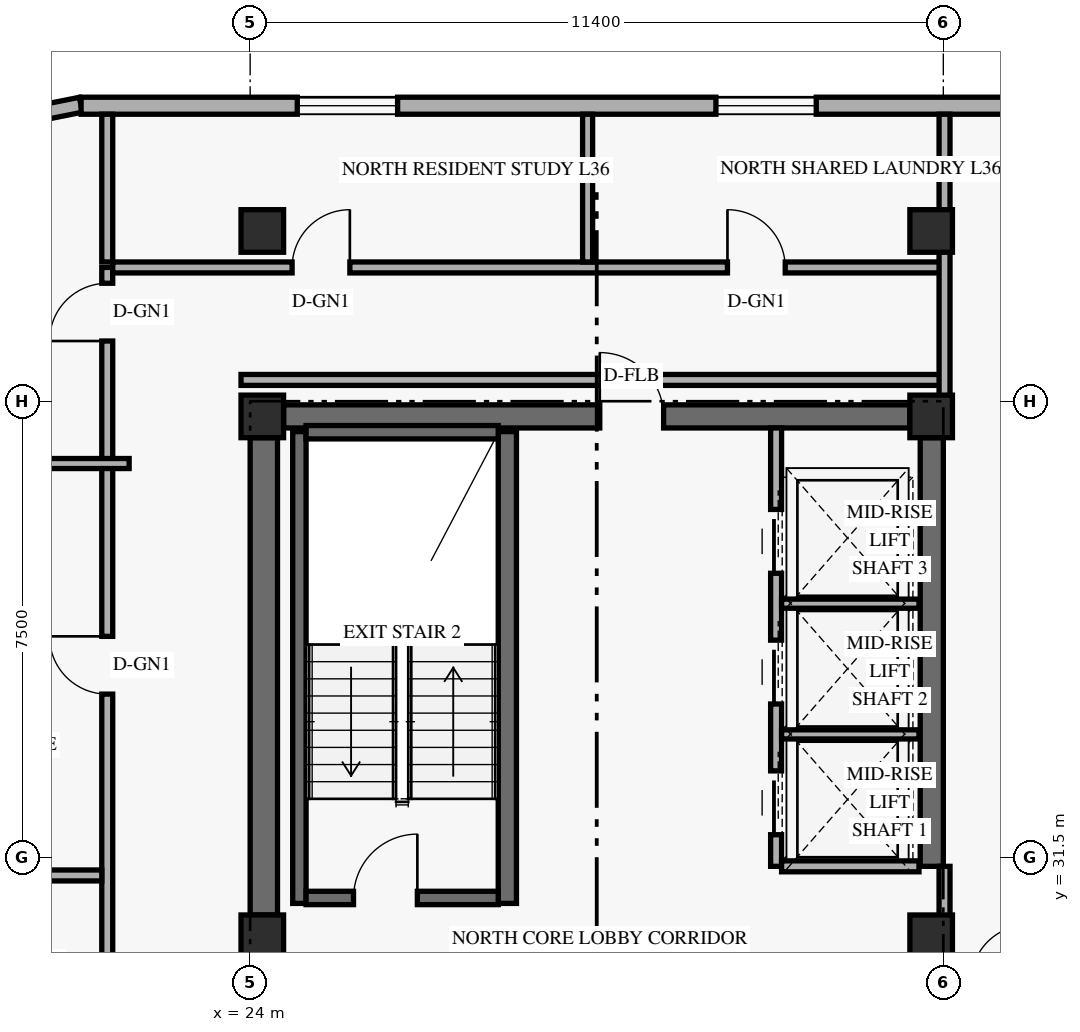
"""IFC4 building model, lengths in metres.
Left out: names, types, materials, properties, quantities, classifications, styles, units other than length and angle.
Written with IfcOpenShell. Run it as: python <this file> out.ifc"""

import sys

from ifc_helpers import new_model, si_unit, direction, frame, frame_2d, origin, origin_2d, place, context, subcontext, project, spatial, rectangle, extrude, element, fill, save


model = new_model("IFC4")
c1 = context("Model", 3, precision=1e-05, world=origin(), true_north=direction((0.0, 1.0)))
c2 = subcontext(c1, "Body", "Model", "MODEL_VIEW")
j1 = project(units=[si_unit("LENGTHUNIT", "METRE"), si_unit("PLANEANGLEUNIT", "RADIAN")], contexts=[c1])
p1 = place(None, origin())
s1 = spatial("IfcSite", under=j1, at=p1, CompositionType="ELEMENT")
p2 = place(p1, origin())
s2 = spatial("IfcBuilding", under=s1, at=p2, CompositionType="ELEMENT")
p3 = place(p2, frame((0.0, 0.0, 141.0)))
s3 = spatial("IfcBuildingStorey", under=s2, at=p3, CompositionType="ELEMENT", Elevation=141.0)
p4 = place(p3, frame((24.225, 30.55, 0.0), z_axis=(0.0, 0.0, 1.0), x_axis=(0.0, 1.0, 0.0)))
e1 = element("IfcWall", 1, at=p4, inside=s3, PredefinedType="SHEAR", context=c2, shape_type="SweptSolid", body=[
    extrude(rectangle(XDim=7.85, YDim=0.45, at=frame_2d((3.925, 0.0))), origin(), (0.0, 0.0, 1.0), 2.748),
])
p5 = place(p3, frame((35.21, 31.35, 0.0), z_axis=(0.0, 0.0, 1.0), x_axis=(0.0, 1.0, 0.0)))
e2 = element("IfcWall", 2, at=p5, inside=s3, PredefinedType="SHEAR", context=c2, shape_type="SweptSolid", body=[
    extrude(rectangle(XDim=7.05, YDim=0.38, at=frame_2d((3.525, 0.0))), origin(), (0.0, 0.0, 1.0), 2.748),
])
p6 = place(p3, frame((24.55, 38.75, 0.0), z_axis=(0.0, 0.0, 1.0), x_axis=(1.0, 0.0, 0.0)))
e3 = element("IfcWall", 3, at=p6, inside=s3, PredefinedType="SHEAR", context=c2, shape_type="SweptSolid", body=[
    extrude(rectangle(XDim=10.3, YDim=0.38, at=frame_2d((5.15, 0.0))), origin(), (0.0, 0.0, 1.0), 3.36),
])
p7 = place(p6, frame((5.2, 0.0, 0.0)))
e4 = element("IfcOpeningElement", 4, at=p7, cuts=e3, PredefinedType="OPENING", context=c2, shape_type="SweptSolid", body=[
    extrude(rectangle(XDim=1.05, YDim=2.15, at=frame_2d((0.525, 1.075))), frame((0.0, 0.2, 0.0), z_axis=(0.0, -1.0, 0.0), x_axis=(1.0, 0.0, 0.0)), (0.0, 0.0, 1.0), 0.4),
])
p8 = place(p3, frame((24.81, 30.74, 0.0), z_axis=(0.0, 0.0, 1.0), x_axis=(0.0, 1.0, 0.0)))
e5 = element("IfcWall", 5, at=p8, inside=s3, PredefinedType="SHEAR", context=c2, shape_type="SweptSolid", body=[
    extrude(rectangle(XDim=7.76, YDim=0.22, at=frame_2d((3.88, 0.0))), origin(), (0.0, 0.0, 1.0), 3.36),
])
p9 = place(p3, frame((28.23, 30.74, 0.0), z_axis=(0.0, 0.0, 1.0), x_axis=(0.0, 1.0, 0.0)))
e6 = element("IfcWall", 6, at=p9, inside=s3, PredefinedType="SHEAR", context=c2, shape_type="SweptSolid", body=[
    extrude(rectangle(XDim=7.76, YDim=0.3, at=frame_2d((3.88, 0.0))), origin(), (0.0, 0.0, 1.0), 3.36),
])
p10 = place(p3, frame((24.92, 30.83, 0.0), z_axis=(0.0, 0.0, 1.0), x_axis=(1.0, 0.0, 0.0)))
e7 = element("IfcWall", 7, at=p10, inside=s3, PredefinedType="SHEAR", context=c2, shape_type="SweptSolid", body=[
    extrude(rectangle(XDim=3.16, YDim=0.22, at=frame_2d((1.58, 0.0))), origin(), (0.0, 0.0, 1.0), 3.36),
])
p11 = place(p10, frame((0.78, 0.0, 0.0)))
e8 = element("IfcOpeningElement", 8, at=p11, cuts=e7, PredefinedType="OPENING", context=c2, shape_type="SweptSolid", body=[
    extrude(rectangle(XDim=1.05, YDim=2.15, at=frame_2d((0.525, 1.075))), frame((0.0, 0.12, 0.0), z_axis=(0.0, -1.0, 0.0), x_axis=(1.0, 0.0, 0.0)), (0.0, 0.0, 1.0), 0.24),
])
p12 = place(p3, frame((24.92, 38.49, 0.0), z_axis=(0.0, 0.0, 1.0), x_axis=(1.0, 0.0, 0.0)))
e9 = element("IfcWall", 9, at=p12, inside=s3, PredefinedType="SHEAR", context=c2, shape_type="SweptSolid", body=[
    extrude(rectangle(XDim=3.16, YDim=0.22, at=frame_2d((1.58, 0.0))), origin(), (0.0, 0.0, 1.0), 3.36),
])
for number, where, z_axis, x_axis in (
    (10, (24.2, 30.2, 0.0), (0.0, 0.0, 1.0), (1.0, 0.0, 0.0)),
    (11, (24.2, 38.75, 0.0), (0.0, 0.0, 1.0), (1.0, 0.0, 0.0)),
    (12, (24.2, 41.8, 0.0), (0.0, 0.0, 1.0), (1.0, 0.0, 0.0)),
    (13, (35.2, 30.2, 0.0), (0.0, 0.0, 1.0), (1.0, 0.0, 0.0)),
    (14, (35.2, 38.75, 0.0), (0.0, 0.0, 1.0), (1.0, 0.0, 0.0)),
    (15, (35.2, 41.8, 0.0), (0.0, 0.0, 1.0), (1.0, 0.0, 0.0)),
):
    element("IfcColumn", number, at=place(p3, frame(where, z_axis=z_axis, x_axis=x_axis)), inside=s3, PredefinedType="COLUMN", context=c2, shape_type="SweptSolid", body=[
        extrude(rectangle(XDim=0.7, YDim=0.7, at=origin_2d()), origin(), (0.0, 0.0, 1.0), 3.6),
    ])
p13 = place(p3, frame((21.217, 43.876, 0.0), z_axis=(0.0, 0.0, 1.0), x_axis=(-0.980809899341, -0.19496651342, 0.0)))
e16 = element("IfcWall", 16, at=p13, inside=s3, PredefinedType="SOLIDWALL", context=c2, shape_type="SweptSolid", body=[
    extrude(rectangle(XDim=1.389, YDim=0.25, at=frame_2d((0.694, 0.0))), origin(), (0.0, 0.0, 1.0), 3.36),
])
p14 = place(p3, frame((54.98, 43.86, 0.0), z_axis=(0.0, 0.0, 1.0), x_axis=(-1.0, 0.0, 0.0)))
e17 = element("IfcWall", 17, at=p14, inside=s3, PredefinedType="SOLIDWALL", context=c2, shape_type="SweptSolid", body=[
    extrude(rectangle(XDim=33.76, YDim=0.28, at=frame_2d((16.88, 0.0))), origin(), (0.0, 0.0, 1.0), 3.36),
])
p15 = place(p14, frame((28.555, 0.0, 0.85)))
e18 = element("IfcOpeningElement", 18, at=p15, cuts=e17, PredefinedType="OPENING", context=c2, shape_type="SweptSolid", body=[
    extrude(rectangle(XDim=1.65, YDim=1.6, at=frame_2d((0.825, 0.8))), frame((0.0, 0.15, 0.0), z_axis=(0.0, -1.0, 0.0), x_axis=(1.0, 0.0, 0.0)), (0.0, 0.0, 1.0), 0.3),
])
p16 = place(p14, frame((21.67, 0.0, 0.85)))
e19 = element("IfcOpeningElement", 19, at=p16, cuts=e17, PredefinedType="OPENING", context=c2, shape_type="SweptSolid", body=[
    extrude(rectangle(XDim=1.65, YDim=1.6, at=frame_2d((0.825, 0.8))), frame((0.0, 0.15, 0.0), z_axis=(0.0, -1.0, 0.0), x_axis=(1.0, 0.0, 0.0)), (0.0, 0.0, 1.0), 0.3),
])
p17 = place(p14, frame((14.476, 0.0, 0.85)))
e20 = element("IfcOpeningElement", 20, at=p17, cuts=e17, PredefinedType="OPENING", context=c2, shape_type="SweptSolid", body=[
    extrude(rectangle(XDim=1.65, YDim=1.6, at=frame_2d((0.825, 0.8))), frame((0.0, 0.15, 0.0), z_axis=(0.0, -1.0, 0.0), x_axis=(1.0, 0.0, 0.0)), (0.0, 0.0, 1.0), 0.3),
])
p18 = place(p14, frame((6.286, 0.0, 0.85)))
e21 = element("IfcOpeningElement", 21, at=p18, cuts=e17, PredefinedType="OPENING", context=c2, shape_type="SweptSolid", body=[
    extrude(rectangle(XDim=1.65, YDim=1.6, at=frame_2d((0.825, 0.8))), frame((0.0, 0.15, 0.0), z_axis=(0.0, -1.0, 0.0), x_axis=(1.0, 0.0, 0.0)), (0.0, 0.0, 1.0), 0.3),
])
p19 = place(p14, frame((0.971, 0.0, 0.85)))
e22 = element("IfcOpeningElement", 22, at=p19, cuts=e17, PredefinedType="OPENING", context=c2, shape_type="SweptSolid", body=[
    extrude(rectangle(XDim=1.65, YDim=1.6, at=frame_2d((0.825, 0.8))), frame((0.0, 0.15, 0.0), z_axis=(0.0, -1.0, 0.0), x_axis=(1.0, 0.0, 0.0)), (0.0, 0.0, 1.0), 0.3),
])
p20 = place(p3, frame((32.65, 31.35, 0.0), z_axis=(0.0, 0.0, 1.0), x_axis=(0.0, 1.0, 0.0)))
e23 = element("IfcWall", 23, at=p20, inside=s3, PredefinedType="STANDARD", context=c2, shape_type="SweptSolid", body=[
    extrude(rectangle(XDim=7.21, YDim=0.18, at=frame_2d((3.605, 0.0))), origin(), (0.0, 0.0, 1.0), 3.36),
])
p21 = place(p20, frame((0.52, 0.0, 0.0)))
e24 = element("IfcOpeningElement", 24, at=p21, cuts=e23, PredefinedType="OPENING", context=c2, shape_type="SweptSolid", body=[
    extrude(rectangle(XDim=1.05, YDim=2.2, at=frame_2d((0.525, 1.1))), frame((0.0, 0.1, 0.0), z_axis=(0.0, -1.0, 0.0), x_axis=(1.0, 0.0, 0.0)), (0.0, 0.0, 1.0), 0.2),
])
p22 = place(p20, frame((2.67, 0.0, 0.0)))
e25 = element("IfcOpeningElement", 25, at=p22, cuts=e23, PredefinedType="OPENING", context=c2, shape_type="SweptSolid", body=[
    extrude(rectangle(XDim=1.05, YDim=2.2, at=frame_2d((0.525, 1.1))), frame((0.0, 0.1, 0.0), z_axis=(0.0, -1.0, 0.0), x_axis=(1.0, 0.0, 0.0)), (0.0, 0.0, 1.0), 0.2),
])
p23 = place(p20, frame((4.82, 0.0, 0.0)))
e26 = element("IfcOpeningElement", 26, at=p23, cuts=e23, PredefinedType="OPENING", context=c2, shape_type="SweptSolid", body=[
    extrude(rectangle(XDim=1.05, YDim=2.2, at=frame_2d((0.525, 1.1))), frame((0.0, 0.1, 0.0), z_axis=(0.0, -1.0, 0.0), x_axis=(1.0, 0.0, 0.0)), (0.0, 0.0, 1.0), 0.2),
])
p24 = place(p3, frame((32.74, 31.35, 0.0), z_axis=(0.0, 0.0, 1.0), x_axis=(1.0, 0.0, 0.0)))
e27 = element("IfcWall", 27, at=p24, inside=s3, PredefinedType="STANDARD", context=c2, shape_type="SweptSolid", body=[
    extrude(rectangle(XDim=2.26, YDim=0.18, at=frame_2d((1.13, 0.0))), origin(), (0.0, 0.0, 1.0), 3.36),
])
for number, where, z_axis, x_axis in (
    (28, (32.74, 33.52, 0.0), (0.0, 0.0, 1.0), (1.0, 0.0, 0.0)),
    (29, (32.74, 35.67, 0.0), (0.0, 0.0, 1.0), (1.0, 0.0, 0.0)),
):
    element("IfcWall", number, at=place(p3, frame(where, z_axis=z_axis, x_axis=x_axis)), inside=s3, PredefinedType="STANDARD", context=c2, shape_type="SweptSolid", body=[
        extrude(rectangle(XDim=2.26, YDim=0.15, at=frame_2d((1.13, 0.0))), origin(), (0.0, 0.0, 1.0), 3.36),
    ])
p25 = place(p3, frame((35.42, 29.46, 0.0), z_axis=(0.0, 0.0, 1.0), x_axis=(0.0, 1.0, 0.0)))
e30 = element("IfcWall", 30, at=p25, inside=s3, PredefinedType="STANDARD", context=c2, shape_type="SweptSolid", body=[
    extrude(rectangle(XDim=1.89, YDim=0.18, at=frame_2d((0.945, 0.0))), origin(), (0.0, 0.0, 1.0), 2.73),
])
p26 = place(p3, frame((21.65, 6.8, 0.0), z_axis=(0.0, 0.0, 1.0), x_axis=(0.0, 1.0, 0.0)))
e31 = element("IfcWall", 31, at=p26, inside=s3, PredefinedType="STANDARD", context=c2, shape_type="SweptSolid", body=[
    extrude(rectangle(XDim=34.4, YDim=0.18, at=frame_2d((17.2, 0.0))), origin(), (0.0, 0.0, 1.0), 2.73),
])
p27 = place(p26, frame((0.3, 0.0, 0.0)))
e32 = element("IfcOpeningElement", 32, at=p27, cuts=e31, PredefinedType="OPENING", context=c2, shape_type="SweptSolid", body=[
    extrude(rectangle(XDim=0.95, YDim=2.15, at=frame_2d((0.475, 1.075))), frame((0.0, 0.1, 0.0), z_axis=(0.0, -1.0, 0.0), x_axis=(1.0, 0.0, 0.0)), (0.0, 0.0, 1.0), 0.2),
])
p28 = place(p26, frame((5.518, 0.0, 0.0)))
e33 = element("IfcOpeningElement", 33, at=p28, cuts=e31, PredefinedType="OPENING", context=c2, shape_type="SweptSolid", body=[
    extrude(rectangle(XDim=0.95, YDim=2.15, at=frame_2d((0.475, 1.075))), frame((0.0, 0.1, 0.0), z_axis=(0.0, -1.0, 0.0), x_axis=(1.0, 0.0, 0.0)), (0.0, 0.0, 1.0), 0.2),
])
p29 = place(p26, frame((12.595, 0.0, 0.0)))
e34 = element("IfcOpeningElement", 34, at=p29, cuts=e31, PredefinedType="OPENING", context=c2, shape_type="SweptSolid", body=[
    extrude(rectangle(XDim=0.95, YDim=2.15, at=frame_2d((0.475, 1.075))), frame((0.0, 0.1, 0.0), z_axis=(0.0, -1.0, 0.0), x_axis=(1.0, 0.0, 0.0)), (0.0, 0.0, 1.0), 0.2),
])
p30 = place(p26, frame((20.105, 0.0, 0.0)))
e35 = element("IfcOpeningElement", 35, at=p30, cuts=e31, PredefinedType="OPENING", context=c2, shape_type="SweptSolid", body=[
    extrude(rectangle(XDim=0.95, YDim=2.15, at=frame_2d((0.475, 1.075))), frame((0.0, 0.1, 0.0), z_axis=(0.0, -1.0, 0.0), x_axis=(1.0, 0.0, 0.0)), (0.0, 0.0, 1.0), 0.2),
])
p31 = place(p26, frame((27.383, 0.0, 0.0)))
e36 = element("IfcOpeningElement", 36, at=p31, cuts=e31, PredefinedType="OPENING", context=c2, shape_type="SweptSolid", body=[
    extrude(rectangle(XDim=0.95, YDim=2.15, at=frame_2d((0.475, 1.075))), frame((0.0, 0.1, 0.0), z_axis=(0.0, -1.0, 0.0), x_axis=(1.0, 0.0, 0.0)), (0.0, 0.0, 1.0), 0.2),
])
p32 = place(p26, frame((33.19, 0.0, 0.0)))
e37 = element("IfcOpeningElement", 37, at=p32, cuts=e31, PredefinedType="OPENING", context=c2, shape_type="SweptSolid", body=[
    extrude(rectangle(XDim=0.95, YDim=2.15, at=frame_2d((0.475, 1.075))), frame((0.0, 0.1, 0.0), z_axis=(0.0, -1.0, 0.0), x_axis=(1.0, 0.0, 0.0)), (0.0, 0.0, 1.0), 0.2),
])
p33 = place(p3, frame((21.74, 41.2, 0.0), z_axis=(0.0, 0.0, 1.0), x_axis=(1.0, 0.0, 0.0)))
e38 = element("IfcWall", 38, at=p33, inside=s3, PredefinedType="STANDARD", context=c2, shape_type="SweptSolid", body=[
    extrude(rectangle(XDim=13.68, YDim=0.18, at=frame_2d((6.84, 0.0))), origin(), (0.0, 0.0, 1.0), 2.73),
])
p34 = place(p33, frame((2.95, 0.0, 0.0)))
e39 = element("IfcOpeningElement", 39, at=p34, cuts=e38, PredefinedType="OPENING", context=c2, shape_type="SweptSolid", body=[
    extrude(rectangle(XDim=0.95, YDim=2.15, at=frame_2d((0.475, 1.075))), frame((0.0, 0.1, 0.0), z_axis=(0.0, -1.0, 0.0), x_axis=(1.0, 0.0, 0.0)), (0.0, 0.0, 1.0), 0.2),
])
p35 = place(p33, frame((10.11, 0.0, 0.0)))
e40 = element("IfcOpeningElement", 40, at=p35, cuts=e38, PredefinedType="OPENING", context=c2, shape_type="SweptSolid", body=[
    extrude(rectangle(XDim=0.95, YDim=2.15, at=frame_2d((0.475, 1.075))), frame((0.0, 0.1, 0.0), z_axis=(0.0, -1.0, 0.0), x_axis=(1.0, 0.0, 0.0)), (0.0, 0.0, 1.0), 0.2),
])
p36 = place(p3, frame((23.85, 39.35, 0.0), z_axis=(0.0, 0.0, 1.0), x_axis=(1.0, 0.0, 0.0)))
e41 = element("IfcWall", 41, at=p36, inside=s3, PredefinedType="STANDARD", context=c2, shape_type="SweptSolid", body=[
    extrude(rectangle(XDim=11.57, YDim=0.18, at=frame_2d((5.785, 0.0))), origin(), (0.0, 0.0, 1.0), 2.73),
])
p37 = place(p3, frame((21.65, 41.29, 0.0), z_axis=(0.0, 0.0, 1.0), x_axis=(0.0, 1.0, 0.0)))
e42 = element("IfcWall", 42, at=p37, inside=s3, PredefinedType="PARTITIONING", context=c2, shape_type="SweptSolid", body=[
    extrude(rectangle(XDim=2.43, YDim=0.18, at=frame_2d((1.215, 0.0))), origin(), (0.0, 0.0, 1.0), 2.879),
])
p38 = place(p3, frame((35.42, 38.75, 0.0), z_axis=(0.0, 0.0, 1.0), x_axis=(0.0, 1.0, 0.0)))
e43 = element("IfcWall", 43, at=p38, inside=s3, PredefinedType="PARTITIONING", context=c2, shape_type="SweptSolid", body=[
    extrude(rectangle(XDim=4.97, YDim=0.18, at=frame_2d((2.485, 0.0))), origin(), (0.0, 0.0, 1.0), 2.73),
])
p39 = place(p3, frame((17.88, 31.2, 0.0), z_axis=(0.0, 0.0, 1.0), x_axis=(1.0, 0.0, 0.0)))
e44 = element("IfcWall", 44, at=p39, inside=s3, PredefinedType="PARTITIONING", context=c2, shape_type="SweptSolid", body=[
    extrude(rectangle(XDim=3.68, YDim=0.18, at=frame_2d((1.84, 0.0))), origin(), (0.0, 0.0, 1.0), 2.879),
])
p40 = place(p3, frame((17.88, 37.975, 0.0), z_axis=(0.0, 0.0, 1.0), x_axis=(1.0, 0.0, 0.0)))
e45 = element("IfcWall", 45, at=p40, inside=s3, PredefinedType="PARTITIONING", context=c2, shape_type="SweptSolid", body=[
    extrude(rectangle(XDim=4.13, YDim=0.165, at=frame_2d((2.065, 0.0))), origin(), (0.0, 0.0, 1.0), 2.879),
])
p41 = place(p3, frame((29.55, 41.29, 0.0), z_axis=(0.0, 0.0, 1.0), x_axis=(0.0, 1.0, 0.0)))
e46 = element("IfcWall", 46, at=p41, inside=s3, PredefinedType="PARTITIONING", context=c2, shape_type="SweptSolid", body=[
    extrude(rectangle(XDim=2.43, YDim=0.165, at=frame_2d((1.215, 0.0))), origin(), (0.0, 0.0, 1.0), 2.879),
])
p42 = place(p15, origin())
e47 = element("IfcWindow", 47, at=p42, inside=s3, PartitioningType="SINGLE_PANEL", PredefinedType="WINDOW", context=c2, shape_type="SweptSolid", body=[
    extrude(rectangle(XDim=1.65, YDim=1.6, at=frame_2d((0.825, 0.8))), frame((0.0, 0.03, 0.0), z_axis=(0.0, -1.0, 0.0), x_axis=(1.0, 0.0, 0.0)), (0.0, 0.0, 1.0), 0.06),
])
fill(e18, e47)
p43 = place(p16, origin())
e48 = element("IfcWindow", 48, at=p43, inside=s3, PartitioningType="SINGLE_PANEL", PredefinedType="WINDOW", context=c2, shape_type="SweptSolid", body=[
    extrude(rectangle(XDim=1.65, YDim=1.6, at=frame_2d((0.825, 0.8))), frame((0.0, 0.03, 0.0), z_axis=(0.0, -1.0, 0.0), x_axis=(1.0, 0.0, 0.0)), (0.0, 0.0, 1.0), 0.06),
])
fill(e19, e48)
p44 = place(p11, origin())
e49 = element("IfcDoor", 49, at=p44, inside=s3, OperationType="SINGLE_SWING_RIGHT", PredefinedType="DOOR", context=c2, shape_type="SweptSolid", body=[
    extrude(rectangle(XDim=1.05, YDim=2.15, at=frame_2d((0.525, 1.075))), frame((0.0, 0.025, 0.0), z_axis=(0.0, -1.0, 0.0), x_axis=(1.0, 0.0, 0.0)), (0.0, 0.0, 1.0), 0.05),
])
fill(e8, e49)
p45 = place(p21, origin())
e50 = element("IfcDoor", 50, at=p45, inside=s3, OperationType="SLIDING_TO_LEFT", PredefinedType="DOOR", context=c2, shape_type="SweptSolid", body=[
    extrude(rectangle(XDim=1.05, YDim=2.2, at=frame_2d((0.525, 1.1))), frame((0.0, 0.025, 0.0), z_axis=(0.0, -1.0, 0.0), x_axis=(1.0, 0.0, 0.0)), (0.0, 0.0, 1.0), 0.05),
])
fill(e24, e50)
p46 = place(p22, origin())
e51 = element("IfcDoor", 51, at=p46, inside=s3, OperationType="SLIDING_TO_LEFT", PredefinedType="DOOR", context=c2, shape_type="SweptSolid", body=[
    extrude(rectangle(XDim=1.05, YDim=2.2, at=frame_2d((0.525, 1.1))), frame((0.0, 0.025, 0.0), z_axis=(0.0, -1.0, 0.0), x_axis=(1.0, 0.0, 0.0)), (0.0, 0.0, 1.0), 0.05),
])
fill(e25, e51)
p47 = place(p23, origin())
e52 = element("IfcDoor", 52, at=p47, inside=s3, OperationType="SLIDING_TO_LEFT", PredefinedType="DOOR", context=c2, shape_type="SweptSolid", body=[
    extrude(rectangle(XDim=1.05, YDim=2.2, at=frame_2d((0.525, 1.1))), frame((0.0, 0.025, 0.0), z_axis=(0.0, -1.0, 0.0), x_axis=(1.0, 0.0, 0.0)), (0.0, 0.0, 1.0), 0.05),
])
fill(e26, e52)
p48 = place(p7, frame((1.05, 0.0, 0.0), z_axis=(0.0, 0.0, 1.0), x_axis=(-1.0, 0.0, 0.0)))
e53 = element("IfcDoor", 53, at=p48, inside=s3, OperationType="SINGLE_SWING_RIGHT", PredefinedType="DOOR", context=c2, shape_type="SweptSolid", body=[
    extrude(rectangle(XDim=1.05, YDim=2.15, at=frame_2d((0.525, 1.075))), frame((0.0, 0.025, 0.0), z_axis=(0.0, -1.0, 0.0), x_axis=(1.0, 0.0, 0.0)), (0.0, 0.0, 1.0), 0.05),
])
fill(e4, e53)
p49 = place(p31, origin())
e54 = element("IfcDoor", 54, at=p49, inside=s3, OperationType="SINGLE_SWING_RIGHT", PredefinedType="DOOR", context=c2, shape_type="SweptSolid", body=[
    extrude(rectangle(XDim=0.95, YDim=2.15, at=frame_2d((0.475, 1.075))), frame((0.0, 0.025, 0.0), z_axis=(0.0, -1.0, 0.0), x_axis=(1.0, 0.0, 0.0)), (0.0, 0.0, 1.0), 0.05),
])
fill(e36, e54)
p50 = place(p32, origin())
e55 = element("IfcDoor", 55, at=p50, inside=s3, OperationType="SINGLE_SWING_LEFT", PredefinedType="DOOR", context=c2, shape_type="SweptSolid", body=[
    extrude(rectangle(XDim=0.95, YDim=2.15, at=frame_2d((0.475, 1.075))), frame((0.0, 0.025, 0.0), z_axis=(0.0, -1.0, 0.0), x_axis=(1.0, 0.0, 0.0)), (0.0, 0.0, 1.0), 0.05),
])
fill(e37, e55)
p51 = place(p34, origin())
e56 = element("IfcDoor", 56, at=p51, inside=s3, OperationType="SINGLE_SWING_RIGHT", PredefinedType="DOOR", context=c2, shape_type="SweptSolid", body=[
    extrude(rectangle(XDim=0.95, YDim=2.15, at=frame_2d((0.475, 1.075))), frame((0.0, 0.025, 0.0), z_axis=(0.0, -1.0, 0.0), x_axis=(1.0, 0.0, 0.0)), (0.0, 0.0, 1.0), 0.05),
])
fill(e39, e56)
p52 = place(p35, origin())
e57 = element("IfcDoor", 57, at=p52, inside=s3, OperationType="SINGLE_SWING_LEFT", PredefinedType="DOOR", context=c2, shape_type="SweptSolid", body=[
    extrude(rectangle(XDim=0.95, YDim=2.15, at=frame_2d((0.475, 1.075))), frame((0.0, 0.025, 0.0), z_axis=(0.0, -1.0, 0.0), x_axis=(1.0, 0.0, 0.0)), (0.0, 0.0, 1.0), 0.05),
])
fill(e40, e57)
save(model, sys.argv[1])
